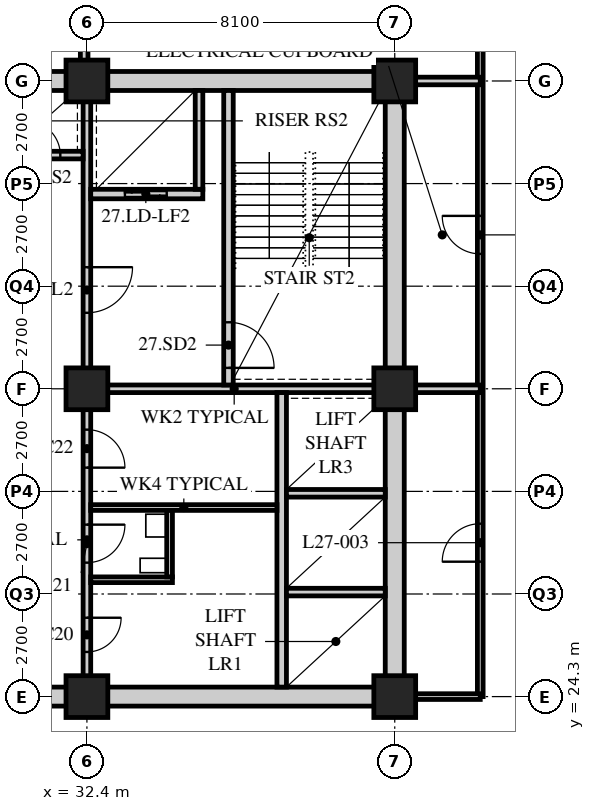
"""IFC4 building model, lengths in metres.
Left out: names, types, materials, properties, quantities, classifications, styles, units other than length and angle.
Written with IfcOpenShell. Run it as: python <this file> out.ifc"""

import sys

from ifc_helpers import new_model, si_unit, direction, frame, frame_2d, origin, origin_2d, place, context, subcontext, project, spatial, rectangle, hollow_rectangle, extrude, element, fill, save


model = new_model("IFC4")
c1 = context("Model", 3, precision=1e-05, world=origin(), true_north=direction((0.0, 1.0)))
c2 = subcontext(c1, "Body", "Model", "MODEL_VIEW")
j1 = project(units=[si_unit("LENGTHUNIT", "METRE"), si_unit("PLANEANGLEUNIT", "RADIAN")], contexts=[c1])
p1 = place(None, origin())
s1 = spatial("IfcSite", under=j1, at=p1, CompositionType="ELEMENT")
p2 = place(p1, origin())
s2 = spatial("IfcBuilding", under=s1, at=p2, CompositionType="ELEMENT")
p3 = place(p2, frame((0.0, 0.0, 110.2)))
s3 = spatial("IfcBuildingStorey", under=s2, at=p3, CompositionType="ELEMENT", Elevation=110.2)
for number, where, z_axis, x_axis in (
    (1, (32.4, 24.3, 0.0), (0.0, 0.0, 1.0), (1.0, 0.0, 0.0)),
    (2, (32.4, 32.4, 0.0), (0.0, 0.0, 1.0), (1.0, 0.0, 0.0)),
    (3, (32.4, 40.5, 0.0), (0.0, 0.0, 1.0), (1.0, 0.0, 0.0)),
    (4, (40.5, 24.3, 0.0), (0.0, 0.0, 1.0), (1.0, 0.0, 0.0)),
    (5, (40.5, 32.4, 0.0), (0.0, 0.0, 1.0), (1.0, 0.0, 0.0)),
    (6, (40.5, 40.5, 0.0), (0.0, 0.0, 1.0), (1.0, 0.0, 0.0)),
):
    element("IfcColumn", number, at=place(p3, frame(where, z_axis=z_axis, x_axis=x_axis)), inside=s3, PredefinedType="COLUMN", context=c2, shape_type="SweptSolid", body=[
        extrude(hollow_rectangle(XDim=1.1, YDim=1.1, WallThickness=0.1, at=origin_2d()), origin(), (0.0, 0.0, 1.0), 3.4),
    ])
p4 = place(p3, frame((42.75, 24.3, 0.0), z_axis=(0.0, 0.0, 1.0), x_axis=(0.0, 1.0, 0.0)))
e7 = element("IfcWall", 7, at=p4, inside=s3, PredefinedType="PARTITIONING", context=c2, shape_type="SweptSolid", body=[
    extrude(rectangle(XDim=19.8, YDim=0.15, at=frame_2d((9.9, 0.0))), origin(), (0.0, 0.0, 1.0), 3.19),
])
p5 = place(p4, frame((3.55, 0.0, 0.0)))
e8 = element("IfcOpeningElement", 8, at=p5, cuts=e7, PredefinedType="OPENING", context=c2, shape_type="SweptSolid", body=[
    extrude(rectangle(XDim=1.0, YDim=2.1, at=frame_2d((0.5, 1.05))), frame((0.0, 0.085, 0.0), z_axis=(0.0, -1.0, 0.0), x_axis=(1.0, 0.0, 0.0)), (0.0, 0.0, 1.0), 0.17),
])
p6 = place(p4, frame((11.65, 0.0, 0.0)))
e9 = element("IfcOpeningElement", 9, at=p6, cuts=e7, PredefinedType="OPENING", context=c2, shape_type="SweptSolid", body=[
    extrude(rectangle(XDim=1.0, YDim=2.1, at=frame_2d((0.5, 1.05))), frame((0.0, 0.085, 0.0), z_axis=(0.0, -1.0, 0.0), x_axis=(1.0, 0.0, 0.0)), (0.0, 0.0, 1.0), 0.17),
])
p7 = place(p3, frame((40.7, 24.3, 0.0), z_axis=(0.0, 0.0, 1.0), x_axis=(1.0, 0.0, 0.0)))
e10 = element("IfcWall", 10, at=p7, inside=s3, PredefinedType="PARTITIONING", context=c2, shape_type="SweptSolid", body=[
    extrude(rectangle(XDim=2.05, YDim=0.15, at=frame_2d((1.025, 0.0))), origin(), (0.0, 0.0, 1.0), 3.19),
])
p8 = place(p3, frame((40.5, 32.4, 0.0), z_axis=(0.0, 0.0, 1.0), x_axis=(1.0, 0.0, 0.0)))
e11 = element("IfcWall", 11, at=p8, inside=s3, PredefinedType="SOLIDWALL", context=c2, shape_type="SweptSolid", body=[
    extrude(rectangle(XDim=2.25, YDim=0.2, at=frame_2d((1.125, 0.0))), origin(), (0.0, 0.0, 1.0), 3.19),
])
p9 = place(p3, frame((32.328, 44.1, 0.0), z_axis=(0.0, 0.0, 1.0), x_axis=(0.0, -1.0, 0.0)))
e12 = element("IfcWall", 12, at=p9, inside=s3, PredefinedType="SOLIDWALL", context=c2, shape_type="SweptSolid", body=[
    extrude(rectangle(XDim=3.6, YDim=0.2, at=frame_2d((1.8, 0.0))), origin(), (0.0, 0.0, 1.0), 2.578),
])
p10 = place(p3, frame((40.5, 40.5, 0.0), z_axis=(0.0, 0.0, 1.0), x_axis=(1.0, 0.0, 0.0)))
e13 = element("IfcWall", 13, at=p10, inside=s3, PredefinedType="SOLIDWALL", context=c2, shape_type="SweptSolid", body=[
    extrude(rectangle(XDim=2.25, YDim=0.2, at=frame_2d((1.125, 0.0))), origin(), (0.0, 0.0, 1.0), 3.19),
])
p11 = place(p3, frame((15.95, 24.3, 0.0), z_axis=(0.0, 0.0, 1.0), x_axis=(1.0, 0.0, 0.0)))
e14 = element("IfcWall", 14, at=p11, inside=s3, PredefinedType="SOLIDWALL", context=c2, shape_type="SweptSolid", body=[
    extrude(rectangle(XDim=24.8, YDim=0.5, at=frame_2d((12.4, 0.0))), origin(), (0.0, 0.0, 1.0), 2.54),
])
p12 = place(p11, frame((11.5, 0.0, 0.0)))
e15 = element("IfcOpeningElement", 15, at=p12, cuts=e14, PredefinedType="OPENING", context=c2, shape_type="SweptSolid", body=[
    extrude(rectangle(XDim=1.8, YDim=2.4, at=frame_2d((0.9, 1.2))), frame((0.0, 0.26, 0.0), z_axis=(0.0, -1.0, 0.0), x_axis=(1.0, 0.0, 0.0)), (0.0, 0.0, 1.0), 0.52),
])
p13 = place(p3, frame((15.95, 40.5, 0.0), z_axis=(0.0, 0.0, 1.0), x_axis=(1.0, 0.0, 0.0)))
e16 = element("IfcWall", 16, at=p13, inside=s3, PredefinedType="SOLIDWALL", context=c2, shape_type="SweptSolid", body=[
    extrude(rectangle(XDim=24.8, YDim=0.5, at=frame_2d((12.4, 0.0))), origin(), (0.0, 0.0, 1.0), 2.54),
])
p14 = place(p13, frame((11.5, 0.0, 0.0)))
e17 = element("IfcOpeningElement", 17, at=p14, cuts=e16, PredefinedType="OPENING", context=c2, shape_type="SweptSolid", body=[
    extrude(rectangle(XDim=1.8, YDim=2.4, at=frame_2d((0.9, 1.2))), frame((0.0, 0.26, 0.0), z_axis=(0.0, -1.0, 0.0), x_axis=(1.0, 0.0, 0.0)), (0.0, 0.0, 1.0), 0.52),
])
p15 = place(p3, frame((40.5, 24.55, 0.0), z_axis=(0.0, 0.0, 1.0), x_axis=(0.0, 1.0, 0.0)))
e18 = element("IfcWall", 18, at=p15, inside=s3, PredefinedType="SOLIDWALL", context=c2, shape_type="SweptSolid", body=[
    extrude(rectangle(XDim=15.7, YDim=0.5, at=frame_2d((7.85, 0.0))), origin(), (0.0, 0.0, 1.0), 2.578),
])
p16 = place(p3, frame((32.3, 32.4, 0.0), z_axis=(0.0, 0.0, 1.0), x_axis=(1.0, 0.0, 0.0)))
e19 = element("IfcWall", 19, at=p16, inside=s3, PredefinedType="SOLIDWALL", context=c2, shape_type="SweptSolid", body=[
    extrude(rectangle(XDim=7.95, YDim=0.2, at=frame_2d((3.975, 0.0))), origin(), (0.0, 0.0, 1.0), 2.578),
])
p17 = place(p3, frame((32.4, 32.5, 0.0), z_axis=(0.0, 0.0, 1.0), x_axis=(0.0, 1.0, 0.0)))
e20 = element("IfcWall", 20, at=p17, inside=s3, PredefinedType="SOLIDWALL", context=c2, shape_type="SweptSolid", body=[
    extrude(rectangle(XDim=7.75, YDim=0.2, at=frame_2d((3.875, 0.0))), origin(), (0.0, 0.0, 1.0), 2.578),
])
p18 = place(p17, frame((1.9, 0.0, 0.0)))
e21 = element("IfcOpeningElement", 21, at=p18, cuts=e20, PredefinedType="OPENING", context=c2, shape_type="SweptSolid", body=[
    extrude(rectangle(XDim=1.2, YDim=2.1, at=frame_2d((0.6, 1.05))), frame((0.0, 0.11, 0.0), z_axis=(0.0, -1.0, 0.0), x_axis=(1.0, 0.0, 0.0)), (0.0, 0.0, 1.0), 0.22),
])
p19 = place(p3, frame((37.525, 24.55, 0.0), z_axis=(0.0, 0.0, 1.0), x_axis=(0.0, 1.0, 0.0)))
e22 = element("IfcWall", 22, at=p19, inside=s3, PredefinedType="SOLIDWALL", context=c2, shape_type="SweptSolid", body=[
    extrude(rectangle(XDim=7.75, YDim=0.25, at=frame_2d((3.875, 0.0))), origin(), (0.0, 0.0, 1.0), 3.19),
])
for number, where, z_axis, x_axis in (
    (23, (37.65, 27.05, 0.0), (0.0, 0.0, 1.0), (1.0, 0.0, 0.0)),
    (24, (37.65, 29.65, 0.0), (0.0, 0.0, 1.0), (1.0, 0.0, 0.0)),
):
    element("IfcWall", number, at=place(p3, frame(where, z_axis=z_axis, x_axis=x_axis)), inside=s3, PredefinedType="SOLIDWALL", context=c2, shape_type="SweptSolid", body=[
        extrude(rectangle(XDim=2.6, YDim=0.2, at=frame_2d((1.3, 0.0))), origin(), (0.0, 0.0, 1.0), 3.19),
    ])
p20 = place(p3, frame((36.125, 32.5, 0.0), z_axis=(0.0, 0.0, 1.0), x_axis=(0.0, 1.0, 0.0)))
e25 = element("IfcWall", 25, at=p20, inside=s3, PredefinedType="SOLIDWALL", context=c2, shape_type="SweptSolid", body=[
    extrude(rectangle(XDim=7.75, YDim=0.25, at=frame_2d((3.875, 0.0))), origin(), (0.0, 0.0, 1.0), 3.19),
])
p21 = place(p20, frame((0.45, 0.0, 0.0)))
e26 = element("IfcOpeningElement", 26, at=p21, cuts=e25, PredefinedType="OPENING", context=c2, shape_type="SweptSolid", body=[
    extrude(rectangle(XDim=1.2, YDim=2.1, at=frame_2d((0.6, 1.05))), frame((0.0, 0.135, 0.0), z_axis=(0.0, -1.0, 0.0), x_axis=(1.0, 0.0, 0.0)), (0.0, 0.0, 1.0), 0.27),
])
p22 = place(p3, frame((32.5, 37.525, 0.0), z_axis=(0.0, 0.0, 1.0), x_axis=(1.0, 0.0, 0.0)))
e27 = element("IfcWall", 27, at=p22, inside=s3, PredefinedType="SOLIDWALL", context=c2, shape_type="SweptSolid", body=[
    extrude(rectangle(XDim=2.95, YDim=0.25, at=frame_2d((1.475, 0.0))), origin(), (0.0, 0.0, 1.0), 3.19),
])
p23 = place(p22, frame((0.9, 0.0, 0.0)))
e28 = element("IfcOpeningElement", 28, at=p23, cuts=e27, PredefinedType="OPENING", context=c2, shape_type="SweptSolid", body=[
    extrude(rectangle(XDim=1.1, YDim=2.4, at=frame_2d((0.55, 1.2))), frame((0.0, 0.135, 0.0), z_axis=(0.0, -1.0, 0.0), x_axis=(1.0, 0.0, 0.0)), (0.0, 0.0, 1.0), 0.27),
])
p24 = place(p3, frame((35.35, 37.65, 0.0), z_axis=(0.0, 0.0, 1.0), x_axis=(0.0, 1.0, 0.0)))
e29 = element("IfcWall", 29, at=p24, inside=s3, PredefinedType="SOLIDWALL", context=c2, shape_type="SweptSolid", body=[
    extrude(rectangle(XDim=2.6, YDim=0.2, at=frame_2d((1.3, 0.0))), origin(), (0.0, 0.0, 1.0), 3.19),
])
p25 = place(p3, frame((30.15, 38.55, 0.0), z_axis=(0.0, 0.0, 1.0), x_axis=(1.0, 0.0, 0.0)))
e30 = element("IfcWall", 30, at=p25, inside=s3, PredefinedType="SOLIDWALL", context=c2, shape_type="SweptSolid", body=[
    extrude(rectangle(XDim=2.15, YDim=0.2, at=frame_2d((1.075, 0.0))), origin(), (0.0, 0.0, 1.0), 3.19),
])
p26 = place(p25, frame((0.65, 0.0, 0.0)))
e31 = element("IfcOpeningElement", 31, at=p26, cuts=e30, PredefinedType="OPENING", context=c2, shape_type="SweptSolid", body=[
    extrude(rectangle(XDim=0.9, YDim=2.1, at=frame_2d((0.45, 1.05))), frame((0.0, 0.11, 0.0), z_axis=(0.0, -1.0, 0.0), x_axis=(1.0, 0.0, 0.0)), (0.0, 0.0, 1.0), 0.22),
])
p27 = place(p3, frame((32.4, 24.55, 0.0), z_axis=(0.0, 0.0, 1.0), x_axis=(0.0, 1.0, 0.0)))
e32 = element("IfcWall", 32, at=p27, inside=s3, PredefinedType="PARTITIONING", context=c2, shape_type="SweptSolid", body=[
    extrude(rectangle(XDim=7.75, YDim=0.2, at=frame_2d((3.875, 0.0))), origin(), (0.0, 0.0, 1.0), 2.578),
])
p28 = place(p27, frame((0.925, 0.0, 0.0)))
e33 = element("IfcOpeningElement", 33, at=p28, cuts=e32, PredefinedType="OPENING", context=c2, shape_type="SweptSolid", body=[
    extrude(rectangle(XDim=0.9, YDim=2.1, at=frame_2d((0.45, 1.05))), frame((0.0, 0.11, 0.0), z_axis=(0.0, -1.0, 0.0), x_axis=(1.0, 0.0, 0.0)), (0.0, 0.0, 1.0), 0.22),
])
p29 = place(p27, frame((3.275, 0.0, 0.0)))
e34 = element("IfcOpeningElement", 34, at=p29, cuts=e32, PredefinedType="OPENING", context=c2, shape_type="SweptSolid", body=[
    extrude(rectangle(XDim=1.0, YDim=2.1, at=frame_2d((0.5, 1.05))), frame((0.0, 0.11, 0.0), z_axis=(0.0, -1.0, 0.0), x_axis=(1.0, 0.0, 0.0)), (0.0, 0.0, 1.0), 0.22),
])
p30 = place(p27, frame((5.775, 0.0, 0.0)))
e35 = element("IfcOpeningElement", 35, at=p30, cuts=e32, PredefinedType="OPENING", context=c2, shape_type="SweptSolid", body=[
    extrude(rectangle(XDim=1.0, YDim=2.1, at=frame_2d((0.5, 1.05))), frame((0.0, 0.11, 0.0), z_axis=(0.0, -1.0, 0.0), x_axis=(1.0, 0.0, 0.0)), (0.0, 0.0, 1.0), 0.22),
])
p31 = place(p3, frame((32.5, 27.375, 0.0), z_axis=(0.0, 0.0, 1.0), x_axis=(1.0, 0.0, 0.0)))
e36 = element("IfcWall", 36, at=p31, inside=s3, PredefinedType="PARTITIONING", context=c2, shape_type="SweptSolid", body=[
    extrude(rectangle(XDim=2.15, YDim=0.15, at=frame_2d((1.075, 0.0))), origin(), (0.0, 0.0, 1.0), 3.19),
])
p32 = place(p3, frame((32.5, 29.275, 0.0), z_axis=(0.0, 0.0, 1.0), x_axis=(1.0, 0.0, 0.0)))
e37 = element("IfcWall", 37, at=p32, inside=s3, PredefinedType="PARTITIONING", context=c2, shape_type="SweptSolid", body=[
    extrude(rectangle(XDim=4.9, YDim=0.15, at=frame_2d((2.45, 0.0))), origin(), (0.0, 0.0, 1.0), 3.19),
])
p33 = place(p3, frame((34.575, 27.45, 0.0), z_axis=(0.0, 0.0, 1.0), x_axis=(0.0, 1.0, 0.0)))
e38 = element("IfcWall", 38, at=p33, inside=s3, PredefinedType="PARTITIONING", context=c2, shape_type="SweptSolid", body=[
    extrude(rectangle(XDim=1.75, YDim=0.15, at=frame_2d((0.875, 0.0))), origin(), (0.0, 0.0, 1.0), 3.19),
])
p34 = place(p5, origin())
e39 = element("IfcDoor", 39, at=p34, inside=s3, OperationType="SINGLE_SWING_LEFT", PredefinedType="DOOR", context=c2, shape_type="SweptSolid", body=[
    extrude(rectangle(XDim=1.0, YDim=2.1, at=frame_2d((0.5, 1.05))), frame((0.0, 0.025, 0.0), z_axis=(0.0, -1.0, 0.0), x_axis=(1.0, 0.0, 0.0)), (0.0, 0.0, 1.0), 0.05),
])
fill(e8, e39)
p35 = place(p6, origin())
e40 = element("IfcDoor", 40, at=p35, inside=s3, OperationType="SINGLE_SWING_RIGHT", PredefinedType="DOOR", context=c2, shape_type="SweptSolid", body=[
    extrude(rectangle(XDim=1.0, YDim=2.1, at=frame_2d((0.5, 1.05))), frame((0.0, 0.025, 0.0), z_axis=(0.0, -1.0, 0.0), x_axis=(1.0, 0.0, 0.0)), (0.0, 0.0, 1.0), 0.05),
])
fill(e9, e40)
p36 = place(p28, origin())
e41 = element("IfcDoor", 41, at=p36, inside=s3, OperationType="SINGLE_SWING_LEFT", PredefinedType="DOOR", context=c2, shape_type="SweptSolid", body=[
    extrude(rectangle(XDim=0.9, YDim=2.1, at=frame_2d((0.45, 1.05))), frame((0.0, 0.025, 0.0), z_axis=(0.0, -1.0, 0.0), x_axis=(1.0, 0.0, 0.0)), (0.0, 0.0, 1.0), 0.05),
])
fill(e33, e41)
p37 = place(p29, origin())
e42 = element("IfcDoor", 42, at=p37, inside=s3, OperationType="SINGLE_SWING_LEFT", PredefinedType="DOOR", context=c2, shape_type="SweptSolid", body=[
    extrude(rectangle(XDim=1.0, YDim=2.1, at=frame_2d((0.5, 1.05))), frame((0.0, 0.025, 0.0), z_axis=(0.0, -1.0, 0.0), x_axis=(1.0, 0.0, 0.0)), (0.0, 0.0, 1.0), 0.05),
])
fill(e34, e42)
p38 = place(p30, origin())
e43 = element("IfcDoor", 43, at=p38, inside=s3, OperationType="SINGLE_SWING_RIGHT", PredefinedType="DOOR", context=c2, shape_type="SweptSolid", body=[
    extrude(rectangle(XDim=1.0, YDim=2.1, at=frame_2d((0.5, 1.05))), frame((0.0, 0.025, 0.0), z_axis=(0.0, -1.0, 0.0), x_axis=(1.0, 0.0, 0.0)), (0.0, 0.0, 1.0), 0.05),
])
fill(e35, e43)
p39 = place(p21, origin())
e44 = element("IfcDoor", 44, at=p39, inside=s3, OperationType="SINGLE_SWING_RIGHT", PredefinedType="DOOR", context=c2, shape_type="SweptSolid", body=[
    extrude(rectangle(XDim=1.2, YDim=2.1, at=frame_2d((0.6, 1.05))), frame((0.0, 0.025, 0.0), z_axis=(0.0, -1.0, 0.0), x_axis=(1.0, 0.0, 0.0)), (0.0, 0.0, 1.0), 0.05),
])
fill(e26, e44)
p40 = place(p18, origin())
e45 = element("IfcDoor", 45, at=p40, inside=s3, OperationType="SINGLE_SWING_LEFT", PredefinedType="DOOR", context=c2, shape_type="SweptSolid", body=[
    extrude(rectangle(XDim=1.2, YDim=2.1, at=frame_2d((0.6, 1.05))), frame((0.0, 0.025, 0.0), z_axis=(0.0, -1.0, 0.0), x_axis=(1.0, 0.0, 0.0)), (0.0, 0.0, 1.0), 0.05),
])
fill(e21, e45)
p41 = place(p26, origin())
e46 = element("IfcDoor", 46, at=p41, inside=s3, OperationType="SINGLE_SWING_LEFT", PredefinedType="DOOR", context=c2, shape_type="SweptSolid", body=[
    extrude(rectangle(XDim=0.9, YDim=2.1, at=frame_2d((0.45, 1.05))), frame((0.0, 0.025, 0.0), z_axis=(0.0, -1.0, 0.0), x_axis=(1.0, 0.0, 0.0)), (0.0, 0.0, 1.0), 0.05),
])
fill(e31, e46)
p42 = place(p23, origin())
e47 = element("IfcDoor", 47, at=p42, inside=s3, OperationType="DOUBLE_DOOR_SLIDING", PredefinedType="DOOR", context=c2, shape_type="SweptSolid", body=[
    extrude(rectangle(XDim=1.1, YDim=2.4, at=frame_2d((0.55, 1.2))), frame((0.0, 0.025, 0.0), z_axis=(0.0, -1.0, 0.0), x_axis=(1.0, 0.0, 0.0)), (0.0, 0.0, 1.0), 0.05),
])
fill(e28, e47)
save(model, sys.argv[1])
